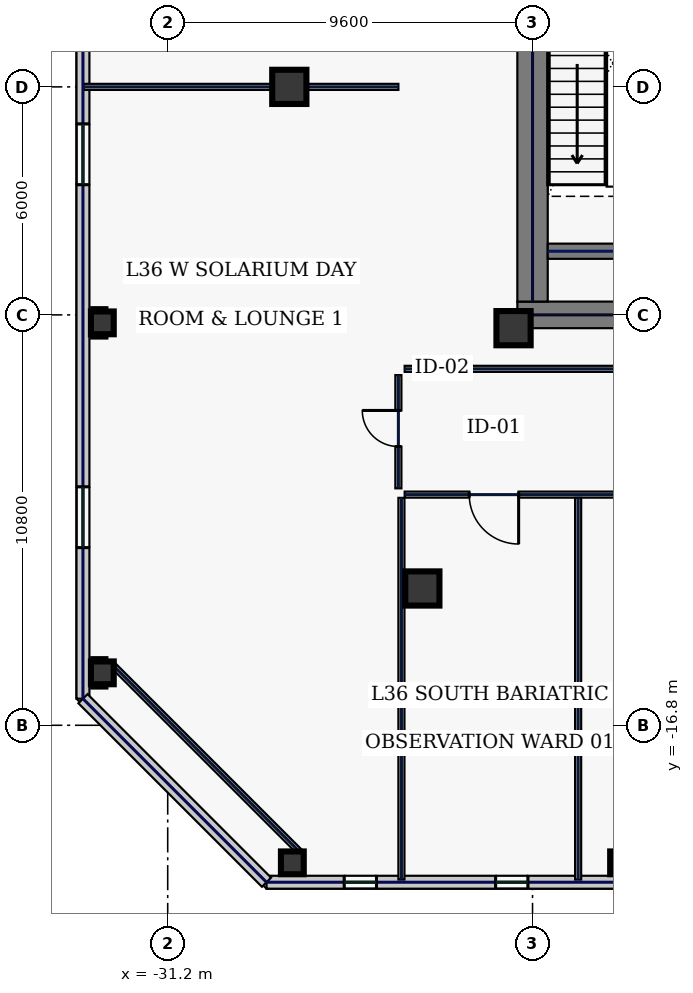
"""IFC4 building model, lengths in metres.
Left out: names, types, materials, properties, quantities, classifications, styles, units other than length and angle.
Written with IfcOpenShell. Run it as: python <this file> out.ifc"""

import sys

from ifc_helpers import new_model, si_unit, direction, frame, frame_2d, origin, origin_2d, place, context, subcontext, project, spatial, rectangle, hollow_rectangle, extrude, element, fill, save


model = new_model("IFC4")
c1 = context("Model", 3, precision=1e-05, world=origin(), true_north=direction((0.0, 1.0)))
c2 = subcontext(c1, "Body", "Model", "MODEL_VIEW")
j1 = project(units=[si_unit("LENGTHUNIT", "METRE"), si_unit("PLANEANGLEUNIT", "RADIAN")], contexts=[c1])
p1 = place(None, origin())
s1 = spatial("IfcSite", under=j1, at=p1, CompositionType="ELEMENT")
p2 = place(p1, origin())
s2 = spatial("IfcBuilding", under=s1, at=p2, CompositionType="ELEMENT")
p3 = place(p2, frame((0.0, 0.0, 160.2)))
s3 = spatial("IfcBuildingStorey", under=s2, at=p3, CompositionType="ELEMENT", Elevation=160.2)
p4 = place(p3, frame((-22.0, -6.0, 0.0), z_axis=(0.0, 0.0, 1.0), x_axis=(1.0, 0.0, 0.0)))
e1 = element("IfcWall", 1, at=p4, inside=s3, PredefinedType="SHEAR", context=c2, shape_type="SweptSolid", body=[
    extrude(rectangle(XDim=11.55, YDim=0.7, at=frame_2d((5.775, 0.0))), origin(), (0.0, 0.0, 1.0), 3.74),
])
p5 = place(p3, frame((-21.6, -5.65, 0.0), z_axis=(0.0, 0.0, 1.0), x_axis=(0.0, 1.0, 0.0)))
e2 = element("IfcWall", 2, at=p5, inside=s3, PredefinedType="SHEAR", context=c2, shape_type="SweptSolid", body=[
    extrude(rectangle(XDim=11.3, YDim=0.8, at=frame_2d((5.65, 0.0))), origin(), (0.0, 0.0, 1.0), 3.74),
])
p6 = place(p3, frame((-21.2, -4.325, 0.0), z_axis=(0.0, 0.0, 1.0), x_axis=(1.0, 0.0, 0.0)))
e3 = element("IfcWall", 3, at=p6, inside=s3, PredefinedType="SHEAR", context=c2, shape_type="SweptSolid", body=[
    extrude(rectangle(XDim=3.4, YDim=0.4, at=frame_2d((1.7, 0.0))), origin(), (0.0, 0.0, 1.0), 3.74),
])
for number, where, z_axis, x_axis in (
    (4, (-22.1, -6.35, 0.0), (0.0, 0.0, 1.0), (1.0, 0.0, 0.0)),
    (5, (-24.5, -13.2, 0.0), (0.0, 0.0, 1.0), (1.0, 0.0, 0.0)),
    (6, (-28.0, 0.0, 0.0), (0.0, 0.0, 1.0), (1.0, 0.0, 0.0)),
):
    element("IfcColumn", number, at=place(p3, frame(where, z_axis=z_axis, x_axis=x_axis)), inside=s3, PredefinedType="COLUMN", context=c2, shape_type="SweptSolid", body=[
        extrude(hollow_rectangle(XDim=0.9, YDim=0.9, WallThickness=0.04, at=origin_2d()), origin(), (0.0, 0.0, 1.0), 3.74),
    ])
for number, where, z_axis, x_axis in (
    (7, (-27.92, -20.42, 0.0), (0.0, 0.0, 1.0), (1.0, 0.0, 0.0)),
    (8, (-19.257, -20.42, 0.0), (0.0, 0.0, 1.0), (1.0, 0.0, 0.0)),
    (9, (-32.92, -6.21, 0.0), (0.0, 0.0, 1.0), (1.0, 0.0, 0.0)),
    (10, (-32.92, -15.42, 0.0), (0.0, 0.0, 1.0), (1.0, 0.0, 0.0)),
):
    element("IfcColumn", number, at=place(p3, frame(where, z_axis=z_axis, x_axis=x_axis)), inside=s3, PredefinedType="COLUMN", context=c2, shape_type="SweptSolid", body=[
        extrude(hollow_rectangle(XDim=0.6, YDim=0.6, WallThickness=0.028, at=origin_2d()), origin(), (0.0, 0.0, 1.0), 3.74),
    ])
p7 = place(p3, frame((-28.6, -20.93, 0.0), z_axis=(0.0, 0.0, 1.0), x_axis=(1.0, 0.0, 0.0)))
e11 = element("IfcWall", 11, at=p7, inside=s3, PredefinedType="STANDARD", context=c2, shape_type="SweptSolid", body=[
    extrude(rectangle(XDim=15.95, YDim=0.34, at=frame_2d((7.975, 0.0))), origin(), (0.0, 0.0, 1.0), 3.74),
])
p8 = place(p7, frame((2.044, 0.0, 0.8)))
e12 = element("IfcOpeningElement", 12, at=p8, cuts=e11, PredefinedType="OPENING", context=c2, shape_type="SweptSolid", body=[
    extrude(rectangle(XDim=0.85, YDim=1.85, at=frame_2d((0.425, 0.925))), frame((0.0, 0.18, 0.0), z_axis=(0.0, -1.0, 0.0), x_axis=(1.0, 0.0, 0.0)), (0.0, 0.0, 1.0), 0.36),
])
p9 = place(p7, frame((6.029, 0.0, 0.8)))
e13 = element("IfcOpeningElement", 13, at=p9, cuts=e11, PredefinedType="OPENING", context=c2, shape_type="SweptSolid", body=[
    extrude(rectangle(XDim=0.85, YDim=1.85, at=frame_2d((0.425, 0.925))), frame((0.0, 0.18, 0.0), z_axis=(0.0, -1.0, 0.0), x_axis=(1.0, 0.0, 0.0)), (0.0, 0.0, 1.0), 0.36),
])
p10 = place(p7, frame((10.707, 0.0, 0.8)))
e14 = element("IfcOpeningElement", 14, at=p10, cuts=e11, PredefinedType="OPENING", context=c2, shape_type="SweptSolid", body=[
    extrude(rectangle(XDim=1.95, YDim=2.1, at=frame_2d((0.975, 1.05))), frame((0.0, 0.18, 0.0), z_axis=(0.0, -1.0, 0.0), x_axis=(1.0, 0.0, 0.0)), (0.0, 0.0, 1.0), 0.36),
])
p11 = place(p3, frame((-33.43, 22.1, 0.0), z_axis=(0.0, 0.0, 1.0), x_axis=(0.0, -1.0, 0.0)))
e15 = element("IfcWall", 15, at=p11, inside=s3, PredefinedType="STANDARD", context=c2, shape_type="SweptSolid", body=[
    extrude(rectangle(XDim=38.2, YDim=0.34, at=frame_2d((19.1, 0.0))), origin(), (0.0, 0.0, 1.0), 3.74),
])
p12 = place(p11, frame((3.975, 0.0, 0.58)))
e16 = element("IfcOpeningElement", 16, at=p12, cuts=e15, PredefinedType="OPENING", context=c2, shape_type="SweptSolid", body=[
    extrude(rectangle(XDim=1.6, YDim=2.3, at=frame_2d((0.8, 1.15))), frame((0.0, 0.18, 0.0), z_axis=(0.0, -1.0, 0.0), x_axis=(1.0, 0.0, 0.0)), (0.0, 0.0, 1.0), 0.36),
])
p13 = place(p11, frame((13.525, 0.0, 0.58)))
e17 = element("IfcOpeningElement", 17, at=p13, cuts=e15, PredefinedType="OPENING", context=c2, shape_type="SweptSolid", body=[
    extrude(rectangle(XDim=1.6, YDim=2.3, at=frame_2d((0.8, 1.15))), frame((0.0, 0.18, 0.0), z_axis=(0.0, -1.0, 0.0), x_axis=(1.0, 0.0, 0.0)), (0.0, 0.0, 1.0), 0.36),
])
p14 = place(p11, frame((23.075, 0.0, 0.58)))
e18 = element("IfcOpeningElement", 18, at=p14, cuts=e15, PredefinedType="OPENING", context=c2, shape_type="SweptSolid", body=[
    extrude(rectangle(XDim=1.6, YDim=2.3, at=frame_2d((0.8, 1.15))), frame((0.0, 0.18, 0.0), z_axis=(0.0, -1.0, 0.0), x_axis=(1.0, 0.0, 0.0)), (0.0, 0.0, 1.0), 0.36),
])
p15 = place(p11, frame((32.625, 0.0, 0.58)))
e19 = element("IfcOpeningElement", 19, at=p15, cuts=e15, PredefinedType="OPENING", context=c2, shape_type="SweptSolid", body=[
    extrude(rectangle(XDim=1.6, YDim=2.3, at=frame_2d((0.8, 1.15))), frame((0.0, 0.18, 0.0), z_axis=(0.0, -1.0, 0.0), x_axis=(1.0, 0.0, 0.0)), (0.0, 0.0, 1.0), 0.36),
])
p16 = place(p3, frame((-33.43, -16.1, 0.0), z_axis=(0.0, 0.0, 1.0), x_axis=(0.707106781187, -0.707106781187, 0.0)))
e20 = element("IfcWall", 20, at=p16, inside=s3, PredefinedType="STANDARD", context=c2, shape_type="SweptSolid", body=[
    extrude(rectangle(XDim=6.83, YDim=0.34, at=frame_2d((3.415, 0.0))), origin(), (0.0, 0.0, 1.0), 3.74),
])
p17 = place(p3, frame((-32.68, -15.18, 0.0), z_axis=(0.0, 0.0, 1.0), x_axis=(0.707106781187, -0.707106781187, 0.0)))
e21 = element("IfcWall", 21, at=p17, inside=s3, PredefinedType="PARTITIONING", context=c2, shape_type="SweptSolid", body=[
    extrude(rectangle(XDim=7.071, YDim=0.16, at=frame_2d((3.536, 0.0))), origin(), (0.0, 0.0, 1.0), 3.74),
])
p18 = place(p3, frame((-25.13, -10.565, 0.0), z_axis=(0.0, 0.0, 1.0), x_axis=(0.0, 1.0, 0.0)))
e22 = element("IfcWall", 22, at=p18, inside=s3, PredefinedType="PARTITIONING", context=c2, shape_type="SweptSolid", body=[
    extrude(rectangle(XDim=2.98, YDim=0.16, at=frame_2d((1.49, 0.0))), origin(), (0.0, 0.0, 1.0), 3.74),
])
p19 = place(p18, frame((1.1, 0.0, 0.0)))
e23 = element("IfcOpeningElement", 23, at=p19, cuts=e22, PredefinedType="OPENING", context=c2, shape_type="SweptSolid", body=[
    extrude(rectangle(XDim=0.95, YDim=2.2, at=frame_2d((0.475, 1.1))), frame((0.0, 0.09, 0.0), z_axis=(0.0, -1.0, 0.0), x_axis=(1.0, 0.0, 0.0)), (0.0, 0.0, 1.0), 0.18),
])
p20 = place(p3, frame((-24.965, -7.42, 0.0), z_axis=(0.0, 0.0, 1.0), x_axis=(1.0, 0.0, 0.0)))
e24 = element("IfcWall", 24, at=p20, inside=s3, PredefinedType="PARTITIONING", context=c2, shape_type="SweptSolid", body=[
    extrude(rectangle(XDim=14.25, YDim=0.16, at=frame_2d((7.125, 0.0))), origin(), (0.0, 0.0, 1.0), 3.74),
])
p21 = place(p3, frame((24.965, -10.73, 0.0), z_axis=(0.0, 0.0, 1.0), x_axis=(-1.0, 0.0, 0.0)))
e25 = element("IfcWall", 25, at=p21, inside=s3, PredefinedType="PARTITIONING", context=c2, shape_type="SweptSolid", body=[
    extrude(rectangle(XDim=49.93, YDim=0.16, at=frame_2d((24.965, 0.0))), origin(), (0.0, 0.0, 1.0), 3.74),
])
p22 = place(p21, frame((46.931, 0.0, 0.0)))
e26 = element("IfcOpeningElement", 26, at=p22, cuts=e25, PredefinedType="OPENING", context=c2, shape_type="SweptSolid", body=[
    extrude(rectangle(XDim=1.3, YDim=2.2, at=frame_2d((0.65, 1.1))), frame((0.0, 0.09, 0.0), z_axis=(0.0, -1.0, 0.0), x_axis=(1.0, 0.0, 0.0)), (0.0, 0.0, 1.0), 0.18),
])
p23 = place(p21, frame((40.363, 0.0, 0.0)))
e27 = element("IfcOpeningElement", 27, at=p23, cuts=e25, PredefinedType="OPENING", context=c2, shape_type="SweptSolid", body=[
    extrude(rectangle(XDim=1.3, YDim=2.2, at=frame_2d((0.65, 1.1))), frame((0.0, 0.09, 0.0), z_axis=(0.0, -1.0, 0.0), x_axis=(1.0, 0.0, 0.0)), (0.0, 0.0, 1.0), 0.18),
])
p24 = place(p21, frame((32.113, 0.0, 0.0)))
e28 = element("IfcOpeningElement", 28, at=p24, cuts=e25, PredefinedType="OPENING", context=c2, shape_type="SweptSolid", body=[
    extrude(rectangle(XDim=0.95, YDim=2.2, at=frame_2d((0.475, 1.1))), frame((0.0, 0.09, 0.0), z_axis=(0.0, -1.0, 0.0), x_axis=(1.0, 0.0, 0.0)), (0.0, 0.0, 1.0), 0.18),
])
p25 = place(p21, frame((24.55, 0.0, 0.0)))
e29 = element("IfcOpeningElement", 29, at=p25, cuts=e25, PredefinedType="OPENING", context=c2, shape_type="SweptSolid", body=[
    extrude(rectangle(XDim=0.95, YDim=2.2, at=frame_2d((0.475, 1.1))), frame((0.0, 0.09, 0.0), z_axis=(0.0, -1.0, 0.0), x_axis=(1.0, 0.0, 0.0)), (0.0, 0.0, 1.0), 0.18),
])
p26 = place(p21, frame((15.875, 0.0, 0.0)))
e30 = element("IfcOpeningElement", 30, at=p26, cuts=e25, PredefinedType="OPENING", context=c2, shape_type="SweptSolid", body=[
    extrude(rectangle(XDim=0.95, YDim=2.2, at=frame_2d((0.475, 1.1))), frame((0.0, 0.09, 0.0), z_axis=(0.0, -1.0, 0.0), x_axis=(1.0, 0.0, 0.0)), (0.0, 0.0, 1.0), 0.18),
])
p27 = place(p21, frame((7.475, 0.0, 0.0)))
e31 = element("IfcOpeningElement", 31, at=p27, cuts=e25, PredefinedType="OPENING", context=c2, shape_type="SweptSolid", body=[
    extrude(rectangle(XDim=1.05, YDim=2.2, at=frame_2d((0.525, 1.1))), frame((0.0, 0.09, 0.0), z_axis=(0.0, -1.0, 0.0), x_axis=(1.0, 0.0, 0.0)), (0.0, 0.0, 1.0), 0.18),
])
p28 = place(p21, frame((1.869, 0.0, 0.0)))
e32 = element("IfcOpeningElement", 32, at=p28, cuts=e25, PredefinedType="OPENING", context=c2, shape_type="SweptSolid", body=[
    extrude(rectangle(XDim=1.3, YDim=2.2, at=frame_2d((0.65, 1.1))), frame((0.0, 0.09, 0.0), z_axis=(0.0, -1.0, 0.0), x_axis=(1.0, 0.0, 0.0)), (0.0, 0.0, 1.0), 0.18),
])
for number, where, z_axis, x_axis in (
    (33, (-25.05, -20.86, 0.0), (0.0, 0.0, 1.0), (0.0, 1.0, 0.0)),
    (34, (-20.4, -20.86, 0.0), (0.0, 0.0, 1.0), (0.0, 1.0, 0.0)),
):
    element("IfcWall", number, at=place(p3, frame(where, z_axis=z_axis, x_axis=x_axis)), inside=s3, PredefinedType="PARTITIONING", context=c2, shape_type="SweptSolid", body=[
        extrude(rectangle(XDim=10.045, YDim=0.16, at=frame_2d((5.022, 0.0))), origin(), (0.0, 0.0, 1.0), 3.74),
    ])
p29 = place(p3, frame((-33.41, 0.0, 0.0), z_axis=(0.0, 0.0, 1.0), x_axis=(1.0, 0.0, 0.0)))
e35 = element("IfcWall", 35, at=p29, inside=s3, PredefinedType="PARTITIONING", context=c2, shape_type="SweptSolid", body=[
    extrude(rectangle(XDim=8.28, YDim=0.16, at=frame_2d((4.14, 0.0))), origin(), (0.0, 0.0, 1.0), 3.74),
])
p30 = place(p8, origin())
e36 = element("IfcWindow", 36, at=p30, inside=s3, PartitioningType="SINGLE_PANEL", PredefinedType="WINDOW", context=c2, shape_type="SweptSolid", body=[
    extrude(rectangle(XDim=0.85, YDim=1.85, at=frame_2d((0.425, 0.925))), frame((0.0, 0.03, 0.0), z_axis=(0.0, -1.0, 0.0), x_axis=(1.0, 0.0, 0.0)), (0.0, 0.0, 1.0), 0.06),
])
fill(e12, e36)
p31 = place(p9, origin())
e37 = element("IfcWindow", 37, at=p31, inside=s3, PartitioningType="SINGLE_PANEL", PredefinedType="WINDOW", context=c2, shape_type="SweptSolid", body=[
    extrude(rectangle(XDim=0.85, YDim=1.85, at=frame_2d((0.425, 0.925))), frame((0.0, 0.03, 0.0), z_axis=(0.0, -1.0, 0.0), x_axis=(1.0, 0.0, 0.0)), (0.0, 0.0, 1.0), 0.06),
])
fill(e13, e37)
p32 = place(p14, origin())
e38 = element("IfcWindow", 38, at=p32, inside=s3, PartitioningType="SINGLE_PANEL", PredefinedType="WINDOW", context=c2, shape_type="SweptSolid", body=[
    extrude(rectangle(XDim=1.6, YDim=2.3, at=frame_2d((0.8, 1.15))), frame((0.0, 0.03, 0.0), z_axis=(0.0, -1.0, 0.0), x_axis=(1.0, 0.0, 0.0)), (0.0, 0.0, 1.0), 0.06),
])
fill(e18, e38)
p33 = place(p15, origin())
e39 = element("IfcWindow", 39, at=p33, inside=s3, PartitioningType="SINGLE_PANEL", PredefinedType="WINDOW", context=c2, shape_type="SweptSolid", body=[
    extrude(rectangle(XDim=1.6, YDim=2.3, at=frame_2d((0.8, 1.15))), frame((0.0, 0.03, 0.0), z_axis=(0.0, -1.0, 0.0), x_axis=(1.0, 0.0, 0.0)), (0.0, 0.0, 1.0), 0.06),
])
fill(e19, e39)
p34 = place(p22, origin())
e40 = element("IfcDoor", 40, at=p34, inside=s3, OperationType="SINGLE_SWING_LEFT", PredefinedType="DOOR", context=c2, shape_type="SweptSolid", body=[
    extrude(rectangle(XDim=1.3, YDim=2.2, at=frame_2d((0.65, 1.1))), frame((0.0, 0.025, 0.0), z_axis=(0.0, -1.0, 0.0), x_axis=(1.0, 0.0, 0.0)), (0.0, 0.0, 1.0), 0.05),
])
fill(e26, e40)
p35 = place(p19, origin())
e41 = element("IfcDoor", 41, at=p35, inside=s3, OperationType="SINGLE_SWING_RIGHT", PredefinedType="DOOR", context=c2, shape_type="SweptSolid", body=[
    extrude(rectangle(XDim=0.95, YDim=2.2, at=frame_2d((0.475, 1.1))), frame((0.0, 0.025, 0.0), z_axis=(0.0, -1.0, 0.0), x_axis=(1.0, 0.0, 0.0)), (0.0, 0.0, 1.0), 0.05),
])
fill(e23, e41)
save(model, sys.argv[1])
